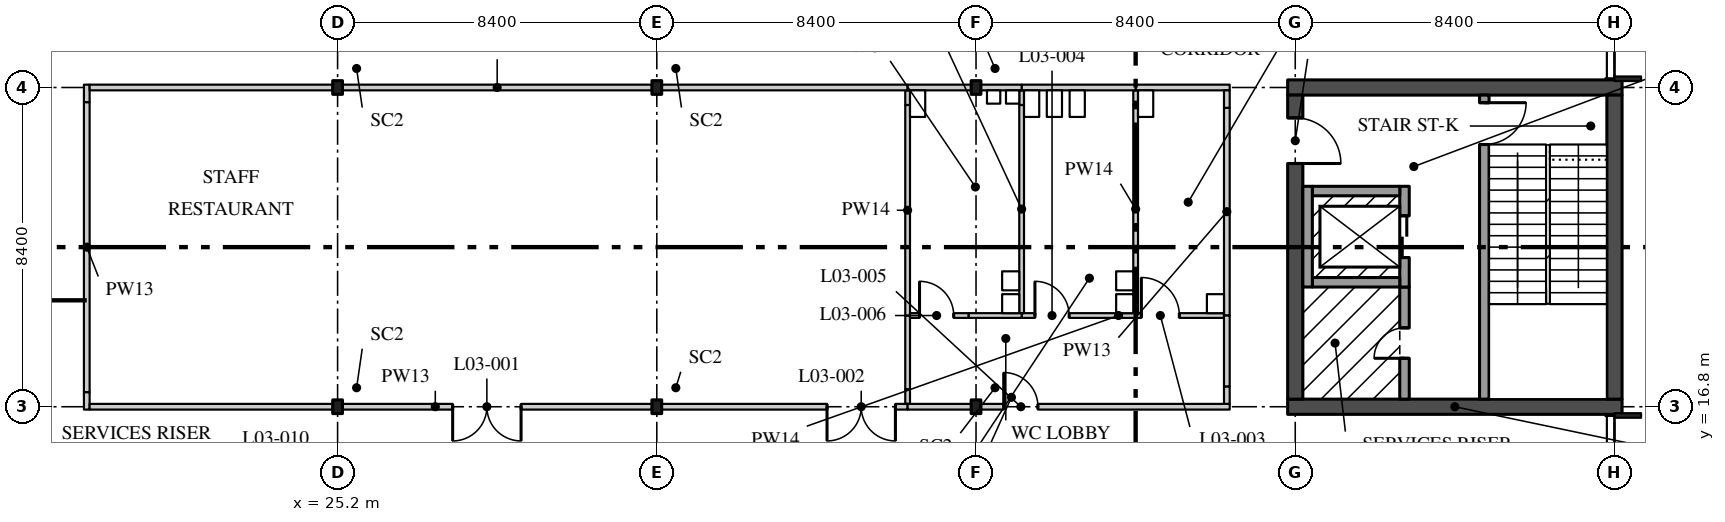
"""IFC4 building model, lengths in metres.
Left out: names, types, materials, properties, quantities, classifications, styles, units other than length and angle.
Written with IfcOpenShell. Run it as: python <this file> out.ifc"""

import sys

from ifc_helpers import new_model, si_unit, direction, frame, frame_2d, origin, origin_2d, place, context, subcontext, project, spatial, rectangle, i_section, extrude, element, fill, save


model = new_model("IFC4")
c1 = context("Model", 3, precision=1e-05, world=origin(), true_north=direction((0.0, 1.0)))
c2 = subcontext(c1, "Body", "Model", "MODEL_VIEW")
j1 = project(units=[si_unit("LENGTHUNIT", "METRE"), si_unit("PLANEANGLEUNIT", "RADIAN")], contexts=[c1])
p1 = place(None, origin())
s1 = spatial("IfcSite", under=j1, at=p1, CompositionType="ELEMENT")
p2 = place(p1, origin())
s2 = spatial("IfcBuilding", under=s1, at=p2, CompositionType="ELEMENT")
p3 = place(p2, frame((0.0, 0.0, 14.4)))
s3 = spatial("IfcBuildingStorey", under=s2, at=p3, CompositionType="ELEMENT", Elevation=14.4)
for number, where, z_axis, x_axis in (
    (1, (25.2, 16.8, 0.0), (0.0, 0.0, 1.0), (1.0, 0.0, 0.0)),
    (2, (25.2, 25.2, 0.0), (0.0, 0.0, 1.0), (1.0, 0.0, 0.0)),
    (3, (33.6, 16.8, 0.0), (0.0, 0.0, 1.0), (1.0, 0.0, 0.0)),
    (4, (33.6, 25.2, 0.0), (0.0, 0.0, 1.0), (1.0, 0.0, 0.0)),
    (5, (42.0, 16.8, 0.0), (0.0, 0.0, 1.0), (1.0, 0.0, 0.0)),
    (6, (42.0, 25.2, 0.0), (0.0, 0.0, 1.0), (1.0, 0.0, 0.0)),
):
    element("IfcColumn", number, at=place(p3, frame(where, z_axis=z_axis, x_axis=x_axis)), inside=s3, PredefinedType="COLUMN", context=c2, shape_type="SweptSolid", body=[
        extrude(i_section(OverallWidth=0.257, OverallDepth=0.361, WebThickness=0.011, FlangeThickness=0.02, FilletRadius=0.015, at=origin_2d()), origin(), (0.0, 0.0, 1.0), 4.37),
    ])
for number, where, z_axis, x_axis in (
    (7, (50.2, 16.8, 0.0), (0.0, 0.0, 1.0), (1.0, 0.0, 0.0)),
    (8, (50.2, 25.2, 0.0), (0.0, 0.0, 1.0), (1.0, 0.0, 0.0)),
):
    element("IfcWall", number, at=place(p3, frame(where, z_axis=z_axis, x_axis=x_axis)), inside=s3, PredefinedType="SHEAR", context=c2, shape_type="SweptSolid", body=[
        extrude(rectangle(XDim=8.8, YDim=0.4, at=frame_2d((4.4, 0.0))), origin(), (0.0, 0.0, 1.0), 4.37),
    ])
p4 = place(p3, frame((50.4, 17.0, 0.0), z_axis=(0.0, 0.0, 1.0), x_axis=(0.0, 1.0, 0.0)))
e9 = element("IfcWall", 9, at=p4, inside=s3, PredefinedType="SHEAR", context=c2, shape_type="SweptSolid", body=[
    extrude(rectangle(XDim=8.0, YDim=0.4, at=frame_2d((4.0, 0.0))), origin(), (0.0, 0.0, 1.0), 4.37),
])
p5 = place(p4, frame((6.2, 0.0, 0.0)))
e10 = element("IfcOpeningElement", 10, at=p5, cuts=e9, PredefinedType="OPENING", context=c2, shape_type="SweptSolid", body=[
    extrude(rectangle(XDim=1.2, YDim=2.1, at=frame_2d((0.6, 1.05))), frame((0.0, 0.21, 0.0), z_axis=(0.0, -1.0, 0.0), x_axis=(1.0, 0.0, 0.0)), (0.0, 0.0, 1.0), 0.42),
])
p6 = place(p3, frame((58.8, 17.0, 0.0), z_axis=(0.0, 0.0, 1.0), x_axis=(0.0, 1.0, 0.0)))
e11 = element("IfcWall", 11, at=p6, inside=s3, PredefinedType="SHEAR", context=c2, shape_type="SweptSolid", body=[
    extrude(rectangle(XDim=8.0, YDim=0.4, at=frame_2d((4.0, 0.0))), origin(), (0.0, 0.0, 1.0), 4.37),
])
p7 = place(p3, frame((55.375, 25.0, 0.0), z_axis=(0.0, 0.0, 1.0), x_axis=(0.0, -1.0, 0.0)))
e12 = element("IfcWall", 12, at=p7, inside=s3, PredefinedType="SOLIDWALL", context=c2, shape_type="SweptSolid", body=[
    extrude(rectangle(XDim=8.0, YDim=0.25, at=frame_2d((4.0, 0.0))), origin(), (0.0, 0.0, 1.0), 4.37),
])
p8 = place(p7, frame((0.2, 0.0, 0.0)))
e13 = element("IfcOpeningElement", 13, at=p8, cuts=e12, PredefinedType="OPENING", context=c2, shape_type="SweptSolid", body=[
    extrude(rectangle(XDim=1.1, YDim=2.1, at=frame_2d((0.55, 1.05))), frame((0.0, 0.135, 0.0), z_axis=(0.0, -1.0, 0.0), x_axis=(1.0, 0.0, 0.0)), (0.0, 0.0, 1.0), 0.27),
])
p9 = place(p3, frame((53.275, 19.95, 0.0), z_axis=(0.0, 0.0, 1.0), x_axis=(0.0, -1.0, 0.0)))
e14 = element("IfcWall", 14, at=p9, inside=s3, PredefinedType="SOLIDWALL", context=c2, shape_type="SweptSolid", body=[
    extrude(rectangle(XDim=2.95, YDim=0.25, at=frame_2d((1.475, 0.0))), origin(), (0.0, 0.0, 1.0), 4.37),
])
p10 = place(p9, frame((1.075, 0.0, 0.0)))
e15 = element("IfcOpeningElement", 15, at=p10, cuts=e14, PredefinedType="OPENING", context=c2, shape_type="SweptSolid", body=[
    extrude(rectangle(XDim=0.8, YDim=2.1, at=frame_2d((0.4, 1.05))), frame((0.0, 0.135, 0.0), z_axis=(0.0, -1.0, 0.0), x_axis=(1.0, 0.0, 0.0)), (0.0, 0.0, 1.0), 0.27),
])
p11 = place(p3, frame((53.275, 19.95, 0.0), z_axis=(0.0, 0.0, 1.0), x_axis=(0.0, 1.0, 0.0)))
e16 = element("IfcWall", 16, at=p11, inside=s3, PredefinedType="SOLIDWALL", context=c2, shape_type="SweptSolid", body=[
    extrude(rectangle(XDim=2.65, YDim=0.25, at=frame_2d((1.325, 0.0))), origin(), (0.0, 0.0, 1.0), 4.37),
])
p12 = place(p11, frame((0.775, 0.0, 0.0)))
e17 = element("IfcOpeningElement", 17, at=p12, cuts=e16, PredefinedType="OPENING", context=c2, shape_type="SweptSolid", body=[
    extrude(rectangle(XDim=1.1, YDim=2.1, at=frame_2d((0.55, 1.05))), frame((0.0, 0.135, 0.0), z_axis=(0.0, -1.0, 0.0), x_axis=(1.0, 0.0, 0.0)), (0.0, 0.0, 1.0), 0.27),
])
for number, where, z_axis, x_axis in (
    (18, (50.85, 22.475, 0.0), (0.0, 0.0, 1.0), (1.0, 0.0, 0.0)),
    (19, (50.85, 20.075, 0.0), (0.0, 0.0, 1.0), (1.0, 0.0, 0.0)),
):
    element("IfcWall", number, at=place(p3, frame(where, z_axis=z_axis, x_axis=x_axis)), inside=s3, PredefinedType="SOLIDWALL", context=c2, shape_type="SweptSolid", body=[
        extrude(rectangle(XDim=2.3, YDim=0.25, at=frame_2d((1.15, 0.0))), origin(), (0.0, 0.0, 1.0), 4.37),
    ])
p13 = place(p3, frame((50.725, 19.95, 0.0), z_axis=(0.0, 0.0, 1.0), x_axis=(0.0, 1.0, 0.0)))
e20 = element("IfcWall", 20, at=p13, inside=s3, PredefinedType="SOLIDWALL", context=c2, shape_type="SweptSolid", body=[
    extrude(rectangle(XDim=2.65, YDim=0.25, at=frame_2d((1.325, 0.0))), origin(), (0.0, 0.0, 1.0), 4.37),
])
p14 = place(p3, frame((40.2, 16.875, 0.0), z_axis=(0.0, 0.0, 1.0), x_axis=(0.0, 1.0, 0.0)))
e21 = element("IfcWall", 21, at=p14, inside=s3, PredefinedType="PARTITIONING", context=c2, shape_type="SweptSolid", body=[
    extrude(rectangle(XDim=0.385, YDim=0.125, at=frame_2d((0.192, 0.0))), origin(), (0.0, 0.0, 1.0), 3.743),
])
p15 = place(p3, frame((40.2, 17.26, 0.0), z_axis=(0.0, 0.0, 1.0), x_axis=(0.0, 1.0, 0.0)))
e22 = element("IfcWall", 22, at=p15, inside=s3, PredefinedType="PARTITIONING", context=c2, shape_type="SweptSolid", body=[
    extrude(rectangle(XDim=1.94, YDim=0.125, at=frame_2d((0.97, 0.0))), origin(), (0.0, 0.0, 1.0), 4.37),
])
p16 = place(p3, frame((40.2, 19.2, 0.0), z_axis=(0.0, 0.0, 1.0), x_axis=(0.0, 1.0, 0.0)))
e23 = element("IfcWall", 23, at=p16, inside=s3, PredefinedType="PARTITIONING", context=c2, shape_type="SweptSolid", body=[
    extrude(rectangle(XDim=5.54, YDim=0.125, at=frame_2d((2.77, 0.0))), origin(), (0.0, 0.0, 1.0), 4.37),
])
p17 = place(p3, frame((40.2, 24.74, 0.0), z_axis=(0.0, 0.0, 1.0), x_axis=(0.0, 1.0, 0.0)))
e24 = element("IfcWall", 24, at=p17, inside=s3, PredefinedType="PARTITIONING", context=c2, shape_type="SweptSolid", body=[
    extrude(rectangle(XDim=0.385, YDim=0.125, at=frame_2d((0.192, 0.0))), origin(), (0.0, 0.0, 1.0), 3.743),
])
p18 = place(p3, frame((18.6, 16.725, 0.0), z_axis=(0.0, 0.0, 1.0), x_axis=(0.0, 1.0, 0.0)))
e25 = element("IfcWall", 25, at=p18, inside=s3, PredefinedType="PARTITIONING", context=c2, shape_type="SweptSolid", body=[
    extrude(rectangle(XDim=0.46, YDim=0.15, at=frame_2d((0.23, 0.0))), origin(), (0.0, 0.0, 1.0), 3.743),
])
p19 = place(p3, frame((18.6, 17.185, 0.0), z_axis=(0.0, 0.0, 1.0), x_axis=(0.0, 1.0, 0.0)))
e26 = element("IfcWall", 26, at=p19, inside=s3, PredefinedType="PARTITIONING", context=c2, shape_type="SweptSolid", body=[
    extrude(rectangle(XDim=7.63, YDim=0.15, at=frame_2d((3.815, 0.0))), origin(), (0.0, 0.0, 1.0), 4.37),
])
p20 = place(p3, frame((18.6, 24.815, 0.0), z_axis=(0.0, 0.0, 1.0), x_axis=(0.0, 1.0, 0.0)))
e27 = element("IfcWall", 27, at=p20, inside=s3, PredefinedType="PARTITIONING", context=c2, shape_type="SweptSolid", body=[
    extrude(rectangle(XDim=0.46, YDim=0.15, at=frame_2d((0.23, 0.0))), origin(), (0.0, 0.0, 1.0), 3.743),
])
p21 = place(p3, frame((18.675, 16.8, 0.0), z_axis=(0.0, 0.0, 1.0), x_axis=(1.0, 0.0, 0.0)))
e28 = element("IfcWall", 28, at=p21, inside=s3, PredefinedType="PARTITIONING", context=c2, shape_type="SweptSolid", body=[
    extrude(rectangle(XDim=6.397, YDim=0.15, at=frame_2d((3.198, 0.0))), origin(), (0.0, 0.0, 1.0), 3.743),
])
p22 = place(p3, frame((25.328, 16.8, 0.0), z_axis=(0.0, 0.0, 1.0), x_axis=(1.0, 0.0, 0.0)))
e29 = element("IfcWall", 29, at=p22, inside=s3, PredefinedType="PARTITIONING", context=c2, shape_type="SweptSolid", body=[
    extrude(rectangle(XDim=8.143, YDim=0.15, at=frame_2d((4.072, 0.0))), origin(), (0.0, 0.0, 1.0), 3.743),
])
p23 = place(p22, frame((2.9, 0.0, 0.0)))
e30 = element("IfcOpeningElement", 30, at=p23, cuts=e29, PredefinedType="OPENING", context=c2, shape_type="SweptSolid", body=[
    extrude(rectangle(XDim=1.8, YDim=2.4, at=frame_2d((0.9, 1.2))), frame((0.0, 0.085, 0.0), z_axis=(0.0, -1.0, 0.0), x_axis=(1.0, 0.0, 0.0)), (0.0, 0.0, 1.0), 0.17),
])
p24 = place(p3, frame((33.729, 16.8, 0.0), z_axis=(0.0, 0.0, 1.0), x_axis=(1.0, 0.0, 0.0)))
e31 = element("IfcWall", 31, at=p24, inside=s3, PredefinedType="PARTITIONING", context=c2, shape_type="SweptSolid", body=[
    extrude(rectangle(XDim=6.471, YDim=0.15, at=frame_2d((3.235, 0.0))), origin(), (0.0, 0.0, 1.0), 3.743),
])
p25 = place(p24, frame((4.35, 0.0, 0.0)))
e32 = element("IfcOpeningElement", 32, at=p25, cuts=e31, PredefinedType="OPENING", context=c2, shape_type="SweptSolid", body=[
    extrude(rectangle(XDim=1.8, YDim=2.4, at=frame_2d((0.9, 1.2))), frame((0.0, 0.085, 0.0), z_axis=(0.0, -1.0, 0.0), x_axis=(1.0, 0.0, 0.0)), (0.0, 0.0, 1.0), 0.17),
])
p26 = place(p3, frame((18.675, 25.2, 0.0), z_axis=(0.0, 0.0, 1.0), x_axis=(1.0, 0.0, 0.0)))
e33 = element("IfcWall", 33, at=p26, inside=s3, PredefinedType="PARTITIONING", context=c2, shape_type="SweptSolid", body=[
    extrude(rectangle(XDim=6.397, YDim=0.15, at=frame_2d((3.198, 0.0))), origin(), (0.0, 0.0, 1.0), 3.743),
])
p27 = place(p3, frame((25.328, 25.2, 0.0), z_axis=(0.0, 0.0, 1.0), x_axis=(1.0, 0.0, 0.0)))
e34 = element("IfcWall", 34, at=p27, inside=s3, PredefinedType="PARTITIONING", context=c2, shape_type="SweptSolid", body=[
    extrude(rectangle(XDim=8.143, YDim=0.15, at=frame_2d((4.072, 0.0))), origin(), (0.0, 0.0, 1.0), 3.743),
])
p28 = place(p3, frame((33.729, 25.2, 0.0), z_axis=(0.0, 0.0, 1.0), x_axis=(1.0, 0.0, 0.0)))
e35 = element("IfcWall", 35, at=p28, inside=s3, PredefinedType="PARTITIONING", context=c2, shape_type="SweptSolid", body=[
    extrude(rectangle(XDim=6.471, YDim=0.15, at=frame_2d((3.235, 0.0))), origin(), (0.0, 0.0, 1.0), 3.743),
])
p29 = place(p3, frame((46.2, 19.262, 0.0), z_axis=(0.0, 0.0, 1.0), x_axis=(0.0, 1.0, 0.0)))
e36 = element("IfcWall", 36, at=p29, inside=s3, PredefinedType="PARTITIONING", context=c2, shape_type="SweptSolid", body=[
    extrude(rectangle(XDim=5.478, YDim=0.125, at=frame_2d((2.739, 0.0))), origin(), (0.0, 0.0, 1.0), 4.37),
])
p30 = place(p3, frame((46.2, 24.74, 0.0), z_axis=(0.0, 0.0, 1.0), x_axis=(0.0, 1.0, 0.0)))
e37 = element("IfcWall", 37, at=p30, inside=s3, PredefinedType="PARTITIONING", context=c2, shape_type="SweptSolid", body=[
    extrude(rectangle(XDim=0.385, YDim=0.125, at=frame_2d((0.192, 0.0))), origin(), (0.0, 0.0, 1.0), 3.743),
])
p31 = place(p3, frame((46.2, 19.2, 0.0), z_axis=(0.0, 0.0, 1.0), x_axis=(1.0, 0.0, 0.0)))
e38 = element("IfcWall", 38, at=p31, inside=s3, PredefinedType="PARTITIONING", context=c2, shape_type="SweptSolid", body=[
    extrude(rectangle(XDim=2.325, YDim=0.125, at=frame_2d((1.163, 0.0))), origin(), (0.0, 0.0, 1.0), 3.941),
])
p32 = place(p31, frame((0.15, 0.0, 0.0)))
e39 = element("IfcOpeningElement", 39, at=p32, cuts=e38, PredefinedType="OPENING", context=c2, shape_type="SweptSolid", body=[
    extrude(rectangle(XDim=1.0, YDim=2.1, at=frame_2d((0.5, 1.05))), frame((0.0, 0.073, 0.0), z_axis=(0.0, -1.0, 0.0), x_axis=(1.0, 0.0, 0.0)), (0.0, 0.0, 1.0), 0.145),
])
p33 = place(p3, frame((46.2, 25.2, 0.0), z_axis=(0.0, 0.0, 1.0), x_axis=(1.0, 0.0, 0.0)))
e40 = element("IfcWall", 40, at=p33, inside=s3, PredefinedType="PARTITIONING", context=c2, shape_type="SweptSolid", body=[
    extrude(rectangle(XDim=2.475, YDim=0.15, at=frame_2d((1.238, 0.0))), origin(), (0.0, 0.0, 1.0), 3.743),
])
p34 = place(p3, frame((48.6, 19.2, 0.0), z_axis=(0.0, 0.0, 1.0), x_axis=(0.0, 1.0, 0.0)))
e41 = element("IfcWall", 41, at=p34, inside=s3, PredefinedType="PARTITIONING", context=c2, shape_type="SweptSolid", body=[
    extrude(rectangle(XDim=5.465, YDim=0.15, at=frame_2d((2.732, 0.0))), origin(), (0.0, 0.0, 1.0), 4.37),
])
p35 = place(p3, frame((48.6, 24.665, 0.0), z_axis=(0.0, 0.0, 1.0), x_axis=(0.0, 1.0, 0.0)))
e42 = element("IfcWall", 42, at=p35, inside=s3, PredefinedType="PARTITIONING", context=c2, shape_type="SweptSolid", body=[
    extrude(rectangle(XDim=0.46, YDim=0.15, at=frame_2d((0.23, 0.0))), origin(), (0.0, 0.0, 1.0), 3.743),
])
p36 = place(p3, frame((43.2, 19.2, 0.0), z_axis=(0.0, 0.0, 1.0), x_axis=(1.0, 0.0, 0.0)))
e43 = element("IfcWall", 43, at=p36, inside=s3, PredefinedType="PARTITIONING", context=c2, shape_type="SweptSolid", body=[
    extrude(rectangle(XDim=3.0, YDim=0.125, at=frame_2d((1.5, 0.0))), origin(), (0.0, 0.0, 1.0), 3.941),
])
p37 = place(p36, frame((0.35, 0.0, 0.0)))
e44 = element("IfcOpeningElement", 44, at=p37, cuts=e43, PredefinedType="OPENING", context=c2, shape_type="SweptSolid", body=[
    extrude(rectangle(XDim=0.9, YDim=2.1, at=frame_2d((0.45, 1.05))), frame((0.0, 0.073, 0.0), z_axis=(0.0, -1.0, 0.0), x_axis=(1.0, 0.0, 0.0)), (0.0, 0.0, 1.0), 0.145),
])
p38 = place(p3, frame((43.2, 19.262, 0.0), z_axis=(0.0, 0.0, 1.0), x_axis=(0.0, 1.0, 0.0)))
e45 = element("IfcWall", 45, at=p38, inside=s3, PredefinedType="PARTITIONING", context=c2, shape_type="SweptSolid", body=[
    extrude(rectangle(XDim=5.478, YDim=0.125, at=frame_2d((2.739, 0.0))), origin(), (0.0, 0.0, 1.0), 4.37),
])
p39 = place(p3, frame((43.2, 24.74, 0.0), z_axis=(0.0, 0.0, 1.0), x_axis=(0.0, 1.0, 0.0)))
e46 = element("IfcWall", 46, at=p39, inside=s3, PredefinedType="PARTITIONING", context=c2, shape_type="SweptSolid", body=[
    extrude(rectangle(XDim=0.385, YDim=0.125, at=frame_2d((0.192, 0.0))), origin(), (0.0, 0.0, 1.0), 3.743),
])
p40 = place(p3, frame((43.2, 25.2, 0.0), z_axis=(0.0, 0.0, 1.0), x_axis=(1.0, 0.0, 0.0)))
e47 = element("IfcWall", 47, at=p40, inside=s3, PredefinedType="PARTITIONING", context=c2, shape_type="SweptSolid", body=[
    extrude(rectangle(XDim=3.0, YDim=0.15, at=frame_2d((1.5, 0.0))), origin(), (0.0, 0.0, 1.0), 3.743),
])
p41 = place(p3, frame((40.263, 19.2, 0.0), z_axis=(0.0, 0.0, 1.0), x_axis=(1.0, 0.0, 0.0)))
e48 = element("IfcWall", 48, at=p41, inside=s3, PredefinedType="PARTITIONING", context=c2, shape_type="SweptSolid", body=[
    extrude(rectangle(XDim=1.544, YDim=0.125, at=frame_2d((0.772, 0.0))), origin(), (0.0, 0.0, 1.0), 4.37),
])
p42 = place(p41, frame((0.25, 0.0, 0.0)))
e49 = element("IfcOpeningElement", 49, at=p42, cuts=e48, PredefinedType="OPENING", context=c2, shape_type="SweptSolid", body=[
    extrude(rectangle(XDim=0.9, YDim=2.1, at=frame_2d((0.45, 1.05))), frame((0.0, 0.073, 0.0), z_axis=(0.0, -1.0, 0.0), x_axis=(1.0, 0.0, 0.0)), (0.0, 0.0, 1.0), 0.145),
])
p43 = place(p3, frame((41.807, 19.2, 0.0), z_axis=(0.0, 0.0, 1.0), x_axis=(1.0, 0.0, 0.0)))
e50 = element("IfcWall", 50, at=p43, inside=s3, PredefinedType="PARTITIONING", context=c2, shape_type="SweptSolid", body=[
    extrude(rectangle(XDim=1.393, YDim=0.125, at=frame_2d((0.697, 0.0))), origin(), (0.0, 0.0, 1.0), 3.743),
])
p44 = place(p3, frame((40.2, 16.8, 0.0), z_axis=(0.0, 0.0, 1.0), x_axis=(1.0, 0.0, 0.0)))
e51 = element("IfcWall", 51, at=p44, inside=s3, PredefinedType="PARTITIONING", context=c2, shape_type="SweptSolid", body=[
    extrude(rectangle(XDim=1.671, YDim=0.15, at=frame_2d((0.835, 0.0))), origin(), (0.0, 0.0, 1.0), 3.743),
])
p45 = place(p3, frame((42.129, 16.8, 0.0), z_axis=(0.0, 0.0, 1.0), x_axis=(1.0, 0.0, 0.0)))
e52 = element("IfcWall", 52, at=p45, inside=s3, PredefinedType="PARTITIONING", context=c2, shape_type="SweptSolid", body=[
    extrude(rectangle(XDim=6.546, YDim=0.15, at=frame_2d((3.273, 0.0))), origin(), (0.0, 0.0, 1.0), 3.743),
])
p46 = place(p45, frame((0.6, 0.0, 0.0)))
e53 = element("IfcOpeningElement", 53, at=p46, cuts=e52, PredefinedType="OPENING", context=c2, shape_type="SweptSolid", body=[
    extrude(rectangle(XDim=0.9, YDim=2.1, at=frame_2d((0.45, 1.05))), frame((0.0, 0.085, 0.0), z_axis=(0.0, -1.0, 0.0), x_axis=(1.0, 0.0, 0.0)), (0.0, 0.0, 1.0), 0.17),
])
p47 = place(p3, frame((48.6, 16.875, 0.0), z_axis=(0.0, 0.0, 1.0), x_axis=(0.0, 1.0, 0.0)))
e54 = element("IfcWall", 54, at=p47, inside=s3, PredefinedType="PARTITIONING", context=c2, shape_type="SweptSolid", body=[
    extrude(rectangle(XDim=0.46, YDim=0.15, at=frame_2d((0.23, 0.0))), origin(), (0.0, 0.0, 1.0), 3.743),
])
p48 = place(p3, frame((48.6, 17.335, 0.0), z_axis=(0.0, 0.0, 1.0), x_axis=(0.0, 1.0, 0.0)))
e55 = element("IfcWall", 55, at=p48, inside=s3, PredefinedType="PARTITIONING", context=c2, shape_type="SweptSolid", body=[
    extrude(rectangle(XDim=1.865, YDim=0.15, at=frame_2d((0.933, 0.0))), origin(), (0.0, 0.0, 1.0), 4.37),
])
p49 = place(p3, frame((40.2, 25.2, 0.0), z_axis=(0.0, 0.0, 1.0), x_axis=(1.0, 0.0, 0.0)))
e56 = element("IfcWall", 56, at=p49, inside=s3, PredefinedType="PARTITIONING", context=c2, shape_type="SweptSolid", body=[
    extrude(rectangle(XDim=1.671, YDim=0.15, at=frame_2d((0.835, 0.0))), origin(), (0.0, 0.0, 1.0), 3.743),
])
p50 = place(p3, frame((42.129, 25.2, 0.0), z_axis=(0.0, 0.0, 1.0), x_axis=(1.0, 0.0, 0.0)))
e57 = element("IfcWall", 57, at=p50, inside=s3, PredefinedType="PARTITIONING", context=c2, shape_type="SweptSolid", body=[
    extrude(rectangle(XDim=1.071, YDim=0.15, at=frame_2d((0.536, 0.0))), origin(), (0.0, 0.0, 1.0), 3.743),
])
p51 = place(p5, frame((1.2, 0.0, 0.0), z_axis=(0.0, 0.0, 1.0), x_axis=(-1.0, 0.0, 0.0)))
e58 = element("IfcDoor", 58, at=p51, inside=s3, OperationType="SINGLE_SWING_LEFT", PredefinedType="DOOR", context=c2, shape_type="SweptSolid", body=[
    extrude(rectangle(XDim=1.2, YDim=2.1, at=frame_2d((0.6, 1.05))), frame((0.0, 0.035, 0.0), z_axis=(0.0, -1.0, 0.0), x_axis=(1.0, 0.0, 0.0)), (0.0, 0.0, 1.0), 0.07),
])
fill(e10, e58)
p52 = place(p10, frame((0.8, 0.0, 0.0), z_axis=(0.0, 0.0, 1.0), x_axis=(-1.0, 0.0, 0.0)))
e59 = element("IfcDoor", 59, at=p52, inside=s3, OperationType="SINGLE_SWING_RIGHT", PredefinedType="DOOR", context=c2, shape_type="SweptSolid", body=[
    extrude(rectangle(XDim=0.8, YDim=2.1, at=frame_2d((0.4, 1.05))), frame((0.0, 0.035, 0.0), z_axis=(0.0, -1.0, 0.0), x_axis=(1.0, 0.0, 0.0)), (0.0, 0.0, 1.0), 0.07),
])
fill(e15, e59)
p53 = place(p8, origin())
e60 = element("IfcDoor", 60, at=p53, inside=s3, OperationType="SINGLE_SWING_RIGHT", PredefinedType="DOOR", context=c2, shape_type="SweptSolid", body=[
    extrude(rectangle(XDim=1.1, YDim=2.1, at=frame_2d((0.55, 1.05))), frame((0.0, 0.035, 0.0), z_axis=(0.0, -1.0, 0.0), x_axis=(1.0, 0.0, 0.0)), (0.0, 0.0, 1.0), 0.07),
])
fill(e13, e60)
p54 = place(p12, origin())
e61 = element("IfcDoor", 61, at=p54, inside=s3, OperationType="DOUBLE_DOOR_SLIDING", PredefinedType="DOOR", context=c2, shape_type="SweptSolid", body=[
    extrude(rectangle(XDim=1.1, YDim=2.1, at=frame_2d((0.55, 1.05))), frame((0.0, 0.04, 0.0), z_axis=(0.0, -1.0, 0.0), x_axis=(1.0, 0.0, 0.0)), (0.0, 0.0, 1.0), 0.08),
])
fill(e17, e61)
p55 = place(p23, frame((1.8, 0.0, 0.0), z_axis=(0.0, 0.0, 1.0), x_axis=(-1.0, 0.0, 0.0)))
e62 = element("IfcDoor", 62, at=p55, inside=s3, OperationType="DOUBLE_DOOR_SINGLE_SWING", PredefinedType="DOOR", context=c2, shape_type="SweptSolid", body=[
    extrude(rectangle(XDim=1.8, YDim=2.4, at=frame_2d((0.9, 1.2))), frame((0.0, 0.025, 0.0), z_axis=(0.0, -1.0, 0.0), x_axis=(1.0, 0.0, 0.0)), (0.0, 0.0, 1.0), 0.05),
])
fill(e30, e62)
p56 = place(p25, frame((1.8, 0.0, 0.0), z_axis=(0.0, 0.0, 1.0), x_axis=(-1.0, 0.0, 0.0)))
e63 = element("IfcDoor", 63, at=p56, inside=s3, OperationType="DOUBLE_DOOR_SINGLE_SWING", PredefinedType="DOOR", context=c2, shape_type="SweptSolid", body=[
    extrude(rectangle(XDim=1.8, YDim=2.4, at=frame_2d((0.9, 1.2))), frame((0.0, 0.025, 0.0), z_axis=(0.0, -1.0, 0.0), x_axis=(1.0, 0.0, 0.0)), (0.0, 0.0, 1.0), 0.05),
])
fill(e32, e63)
p57 = place(p32, origin())
e64 = element("IfcDoor", 64, at=p57, inside=s3, OperationType="SINGLE_SWING_RIGHT", PredefinedType="DOOR", context=c2, shape_type="SweptSolid", body=[
    extrude(rectangle(XDim=1.0, YDim=2.1, at=frame_2d((0.5, 1.05))), frame((0.0, 0.02, 0.0), z_axis=(0.0, -1.0, 0.0), x_axis=(1.0, 0.0, 0.0)), (0.0, 0.0, 1.0), 0.04),
])
fill(e39, e64)
p58 = place(p37, origin())
e65 = element("IfcDoor", 65, at=p58, inside=s3, OperationType="SINGLE_SWING_RIGHT", PredefinedType="DOOR", context=c2, shape_type="SweptSolid", body=[
    extrude(rectangle(XDim=0.9, YDim=2.1, at=frame_2d((0.45, 1.05))), frame((0.0, 0.02, 0.0), z_axis=(0.0, -1.0, 0.0), x_axis=(1.0, 0.0, 0.0)), (0.0, 0.0, 1.0), 0.04),
])
fill(e44, e65)
p59 = place(p46, origin())
e66 = element("IfcDoor", 66, at=p59, inside=s3, OperationType="SINGLE_SWING_RIGHT", PredefinedType="DOOR", context=c2, shape_type="SweptSolid", body=[
    extrude(rectangle(XDim=0.9, YDim=2.1, at=frame_2d((0.45, 1.05))), frame((0.0, 0.025, 0.0), z_axis=(0.0, -1.0, 0.0), x_axis=(1.0, 0.0, 0.0)), (0.0, 0.0, 1.0), 0.05),
])
fill(e53, e66)
p60 = place(p42, origin())
e67 = element("IfcDoor", 67, at=p60, inside=s3, OperationType="SINGLE_SWING_RIGHT", PredefinedType="DOOR", context=c2, shape_type="SweptSolid", body=[
    extrude(rectangle(XDim=0.9, YDim=2.1, at=frame_2d((0.45, 1.05))), frame((0.0, 0.02, 0.0), z_axis=(0.0, -1.0, 0.0), x_axis=(1.0, 0.0, 0.0)), (0.0, 0.0, 1.0), 0.04),
])
fill(e49, e67)
save(model, sys.argv[1])
